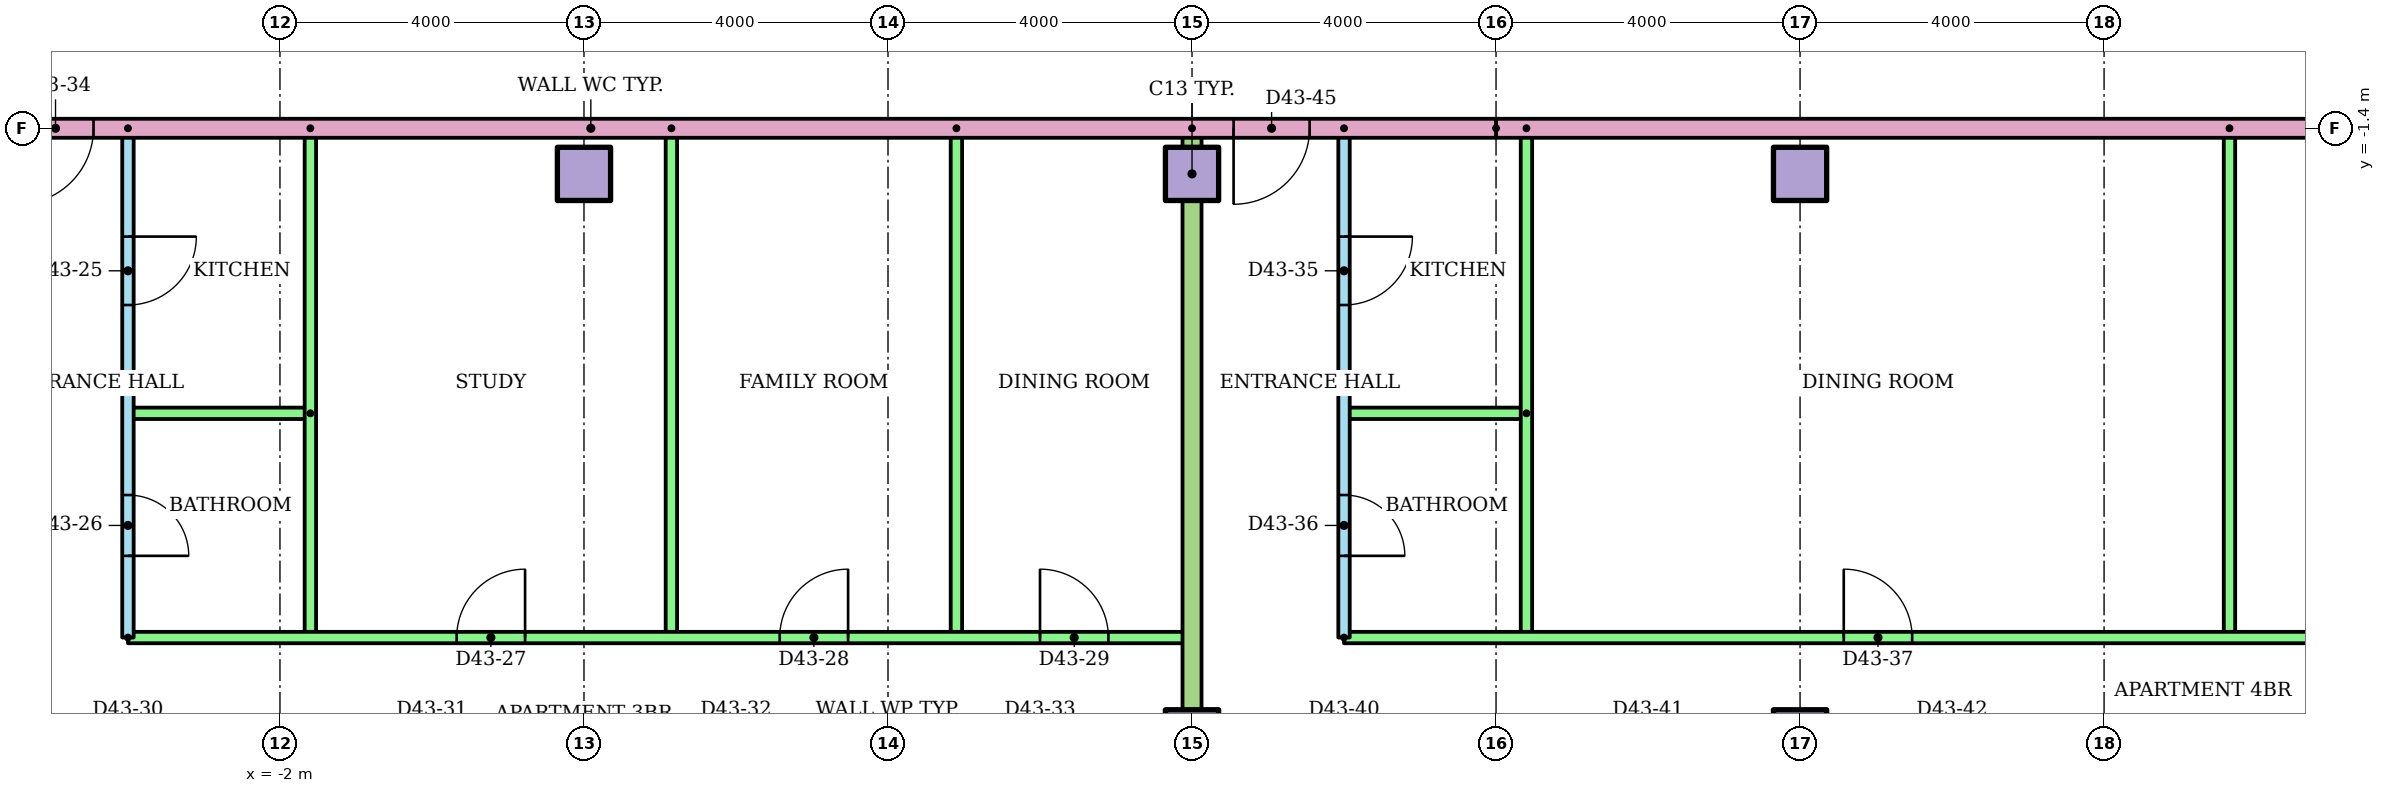
"""IFC4 building model, lengths in metres.
Left out: names, types, materials, properties, quantities, classifications, styles, units other than length and angle.
Written with IfcOpenShell. Run it as: python <this file> out.ifc"""

import sys

from ifc_helpers import new_model, si_unit, direction, frame, frame_2d, origin, origin_2d, place, context, subcontext, project, spatial, rectangle, extrude, element, fill, save


model = new_model("IFC4")
c1 = context("Model", 3, precision=1e-05, world=origin(), true_north=direction((0.0, 1.0)))
c2 = subcontext(c1, "Body", "Model", "MODEL_VIEW")
j1 = project(units=[si_unit("LENGTHUNIT", "METRE"), si_unit("PLANEANGLEUNIT", "RADIAN")], contexts=[c1])
p1 = place(None, origin())
s1 = spatial("IfcSite", under=j1, at=p1, CompositionType="ELEMENT")
p2 = place(p1, origin())
s2 = spatial("IfcBuilding", under=s1, at=p2, CompositionType="ELEMENT")
p3 = place(p2, frame((0.0, 0.0, 168.5)))
s3 = spatial("IfcBuildingStorey", under=s2, at=p3, CompositionType="ELEMENT", Elevation=168.5)
for number, where in (
    (1, (2.0, -9.4, 0.0)),
    (2, (10.0, -9.4, 0.0)),
    (3, (18.0, -9.4, 0.0)),
    (4, (2.0, -2.0, 0.0)),
    (5, (10.0, -2.0, 0.0)),
    (6, (18.0, -2.0, 0.0)),
):
    element("IfcColumn", number, at=place(p3, frame(where)), inside=s3, PredefinedType="COLUMN", context=c2, shape_type="SweptSolid", body=[
        extrude(rectangle(XDim=0.7, YDim=0.7, at=origin_2d()), origin(), (0.0, 0.0, 1.0), 3.2),
    ])
p4 = place(p3, frame((-4.0, -1.4, 0.0), z_axis=(0.0, 0.0, 1.0), x_axis=(0.0, -1.0, 0.0)))
e7 = element("IfcWall", 7, at=p4, inside=s3, PredefinedType="PARTITIONING", context=c2, shape_type="SweptSolid", body=[
    extrude(rectangle(XDim=6.7, YDim=0.15, at=frame_2d((3.35, 0.0))), origin(), (0.0, 0.0, 1.0), 2.4),
])
p5 = place(p4, frame((1.425, 0.0, 0.0)))
e8 = element("IfcOpeningElement", 8, at=p5, cuts=e7, PredefinedType="OPENING", context=c2, shape_type="SweptSolid", body=[
    extrude(rectangle(XDim=0.9, YDim=2.1, at=frame_2d((0.45, 1.05))), frame((0.0, 0.085, 0.0), z_axis=(0.0, -1.0, 0.0), x_axis=(1.0, 0.0, 0.0)), (0.0, 0.0, 1.0), 0.17),
])
p6 = place(p4, frame((4.825, 0.0, 0.0)))
e9 = element("IfcOpeningElement", 9, at=p6, cuts=e7, PredefinedType="OPENING", context=c2, shape_type="SweptSolid", body=[
    extrude(rectangle(XDim=0.8, YDim=2.1, at=frame_2d((0.4, 1.05))), frame((0.0, 0.085, 0.0), z_axis=(0.0, -1.0, 0.0), x_axis=(1.0, 0.0, 0.0)), (0.0, 0.0, 1.0), 0.17),
])
p7 = place(p3, frame((-1.6, -5.15, 0.0), z_axis=(0.0, 0.0, 1.0), x_axis=(-1.0, 0.0, 0.0)))
e10 = element("IfcWall", 10, at=p7, inside=s3, PredefinedType="PARTITIONING", context=c2, shape_type="SweptSolid", body=[
    extrude(rectangle(XDim=2.4, YDim=0.15, at=frame_2d((1.2, 0.0))), origin(), (0.0, 0.0, 1.0), 2.4),
])
for number, where, z_axis, x_axis in (
    (11, (-1.6, -1.4, 0.0), (0.0, 0.0, 1.0), (0.0, -1.0, 0.0)),
    (12, (3.15, -1.4, 0.0), (0.0, 0.0, 1.0), (0.0, -1.0, 0.0)),
    (13, (6.9, -1.4, 0.0), (0.0, 0.0, 1.0), (0.0, -1.0, 0.0)),
):
    element("IfcWall", number, at=place(p3, frame(where, z_axis=z_axis, x_axis=x_axis)), inside=s3, PredefinedType="PARTITIONING", context=c2, shape_type="SweptSolid", body=[
        extrude(rectangle(XDim=6.7, YDim=0.15, at=frame_2d((3.35, 0.0))), origin(), (0.0, 0.0, 1.0), 2.4),
    ])
p8 = place(p3, frame((-4.0, -8.1, 0.0)))
e14 = element("IfcWall", 14, at=p8, inside=s3, PredefinedType="PARTITIONING", context=c2, shape_type="SweptSolid", body=[
    extrude(rectangle(XDim=14.0, YDim=0.15, at=frame_2d((7.0, 0.0))), origin(), (0.0, 0.0, 1.0), 2.4),
])
p9 = place(p8, frame((4.325, 0.0, 0.0)))
e15 = element("IfcOpeningElement", 15, at=p9, cuts=e14, PredefinedType="OPENING", context=c2, shape_type="SweptSolid", body=[
    extrude(rectangle(XDim=0.9, YDim=2.1, at=frame_2d((0.45, 1.05))), frame((0.0, 0.085, 0.0), z_axis=(0.0, -1.0, 0.0), x_axis=(1.0, 0.0, 0.0)), (0.0, 0.0, 1.0), 0.17),
])
p10 = place(p8, frame((8.575, 0.0, 0.0)))
e16 = element("IfcOpeningElement", 16, at=p10, cuts=e14, PredefinedType="OPENING", context=c2, shape_type="SweptSolid", body=[
    extrude(rectangle(XDim=0.9, YDim=2.1, at=frame_2d((0.45, 1.05))), frame((0.0, 0.085, 0.0), z_axis=(0.0, -1.0, 0.0), x_axis=(1.0, 0.0, 0.0)), (0.0, 0.0, 1.0), 0.17),
])
p11 = place(p8, frame((12.0, 0.0, 0.0)))
e17 = element("IfcOpeningElement", 17, at=p11, cuts=e14, PredefinedType="OPENING", context=c2, shape_type="SweptSolid", body=[
    extrude(rectangle(XDim=0.9, YDim=2.1, at=frame_2d((0.45, 1.05))), frame((0.0, 0.085, 0.0), z_axis=(0.0, -1.0, 0.0), x_axis=(1.0, 0.0, 0.0)), (0.0, 0.0, 1.0), 0.17),
])
p12 = place(p3, frame((12.0, -1.4, 0.0), z_axis=(0.0, 0.0, 1.0), x_axis=(0.0, -1.0, 0.0)))
e18 = element("IfcWall", 18, at=p12, inside=s3, PredefinedType="PARTITIONING", context=c2, shape_type="SweptSolid", body=[
    extrude(rectangle(XDim=6.7, YDim=0.15, at=frame_2d((3.35, 0.0))), origin(), (0.0, 0.0, 1.0), 2.4),
])
p13 = place(p12, frame((1.425, 0.0, 0.0)))
e19 = element("IfcOpeningElement", 19, at=p13, cuts=e18, PredefinedType="OPENING", context=c2, shape_type="SweptSolid", body=[
    extrude(rectangle(XDim=0.9, YDim=2.1, at=frame_2d((0.45, 1.05))), frame((0.0, 0.085, 0.0), z_axis=(0.0, -1.0, 0.0), x_axis=(1.0, 0.0, 0.0)), (0.0, 0.0, 1.0), 0.17),
])
p14 = place(p12, frame((4.825, 0.0, 0.0)))
e20 = element("IfcOpeningElement", 20, at=p14, cuts=e18, PredefinedType="OPENING", context=c2, shape_type="SweptSolid", body=[
    extrude(rectangle(XDim=0.8, YDim=2.1, at=frame_2d((0.4, 1.05))), frame((0.0, 0.085, 0.0), z_axis=(0.0, -1.0, 0.0), x_axis=(1.0, 0.0, 0.0)), (0.0, 0.0, 1.0), 0.17),
])
p15 = place(p3, frame((14.4, -5.15, 0.0), z_axis=(0.0, 0.0, 1.0), x_axis=(-1.0, 0.0, 0.0)))
e21 = element("IfcWall", 21, at=p15, inside=s3, PredefinedType="PARTITIONING", context=c2, shape_type="SweptSolid", body=[
    extrude(rectangle(XDim=2.4, YDim=0.15, at=frame_2d((1.2, 0.0))), origin(), (0.0, 0.0, 1.0), 2.4),
])
for number, where, z_axis, x_axis in (
    (22, (14.4, -1.4, 0.0), (0.0, 0.0, 1.0), (0.0, -1.0, 0.0)),
    (23, (23.65, -1.4, 0.0), (0.0, 0.0, 1.0), (0.0, -1.0, 0.0)),
):
    element("IfcWall", number, at=place(p3, frame(where, z_axis=z_axis, x_axis=x_axis)), inside=s3, PredefinedType="PARTITIONING", context=c2, shape_type="SweptSolid", body=[
        extrude(rectangle(XDim=6.7, YDim=0.15, at=frame_2d((3.35, 0.0))), origin(), (0.0, 0.0, 1.0), 2.4),
    ])
p16 = place(p3, frame((12.0, -8.1, 0.0)))
e24 = element("IfcWall", 24, at=p16, inside=s3, PredefinedType="PARTITIONING", context=c2, shape_type="SweptSolid", body=[
    extrude(rectangle(XDim=24.82, YDim=0.15, at=frame_2d((12.41, 0.0))), origin(), (0.0, 0.0, 1.0), 2.4),
])
p17 = place(p16, frame((6.575, 0.0, 0.0)))
e25 = element("IfcOpeningElement", 25, at=p17, cuts=e24, PredefinedType="OPENING", context=c2, shape_type="SweptSolid", body=[
    extrude(rectangle(XDim=0.9, YDim=2.1, at=frame_2d((0.45, 1.05))), frame((0.0, 0.085, 0.0), z_axis=(0.0, -1.0, 0.0), x_axis=(1.0, 0.0, 0.0)), (0.0, 0.0, 1.0), 0.17),
])
p18 = place(p16, frame((14.825, 0.0, 0.0)))
e26 = element("IfcOpeningElement", 26, at=p18, cuts=e24, PredefinedType="OPENING", context=c2, shape_type="SweptSolid", body=[
    extrude(rectangle(XDim=0.9, YDim=2.1, at=frame_2d((0.45, 1.05))), frame((0.0, 0.085, 0.0), z_axis=(0.0, -1.0, 0.0), x_axis=(1.0, 0.0, 0.0)), (0.0, 0.0, 1.0), 0.17),
])
p19 = place(p16, frame((20.553, 0.0, 0.0)))
e27 = element("IfcOpeningElement", 27, at=p19, cuts=e24, PredefinedType="OPENING", context=c2, shape_type="SweptSolid", body=[
    extrude(rectangle(XDim=0.9, YDim=2.1, at=frame_2d((0.45, 1.05))), frame((0.0, 0.085, 0.0), z_axis=(0.0, -1.0, 0.0), x_axis=(1.0, 0.0, 0.0)), (0.0, 0.0, 1.0), 0.17),
])
p20 = place(p3, frame((10.0, -1.4, 0.0), z_axis=(0.0, 0.0, 1.0), x_axis=(0.0, -1.0, 0.0)))
e28 = element("IfcWall", 28, at=p20, inside=s3, PredefinedType="PARTITIONING", context=c2, shape_type="SweptSolid", body=[
    extrude(rectangle(XDim=15.01, YDim=0.25, at=frame_2d((7.505, 0.0))), origin(), (0.0, 0.0, 1.0), 2.4),
])
p21 = place(p3, frame((29.0, -1.4, 0.0), z_axis=(0.0, 0.0, 1.0), x_axis=(-1.0, 0.0, 0.0)))
e29 = element("IfcWall", 29, at=p21, inside=s3, PredefinedType="PARTITIONING", context=c2, shape_type="SweptSolid", body=[
    extrude(rectangle(XDim=15.0, YDim=0.25, at=frame_2d((7.5, 0.0))), origin(), (0.0, 0.0, 1.0), 2.4),
])
p22 = place(p3, frame((14.0, -1.4, 0.0), z_axis=(0.0, 0.0, 1.0), x_axis=(-1.0, 0.0, 0.0)))
e30 = element("IfcWall", 30, at=p22, inside=s3, PredefinedType="PARTITIONING", context=c2, shape_type="SweptSolid", body=[
    extrude(rectangle(XDim=28.0, YDim=0.25, at=frame_2d((14.0, 0.0))), origin(), (0.0, 0.0, 1.0), 2.4),
])
p23 = place(p22, frame((20.547, 0.0, 0.0)))
e31 = element("IfcOpeningElement", 31, at=p23, cuts=e30, PredefinedType="OPENING", context=c2, shape_type="SweptSolid", body=[
    extrude(rectangle(XDim=1.0, YDim=2.1, at=frame_2d((0.5, 1.05))), frame((0.0, 0.135, 0.0), z_axis=(0.0, -1.0, 0.0), x_axis=(1.0, 0.0, 0.0)), (0.0, 0.0, 1.0), 0.27),
])
p24 = place(p22, frame((18.453, 0.0, 0.0)))
e32 = element("IfcOpeningElement", 32, at=p24, cuts=e30, PredefinedType="OPENING", context=c2, shape_type="SweptSolid", body=[
    extrude(rectangle(XDim=1.0, YDim=2.1, at=frame_2d((0.5, 1.05))), frame((0.0, 0.135, 0.0), z_axis=(0.0, -1.0, 0.0), x_axis=(1.0, 0.0, 0.0)), (0.0, 0.0, 1.0), 0.27),
])
p25 = place(p22, frame((2.453, 0.0, 0.0)))
e33 = element("IfcOpeningElement", 33, at=p25, cuts=e30, PredefinedType="OPENING", context=c2, shape_type="SweptSolid", body=[
    extrude(rectangle(XDim=1.0, YDim=2.1, at=frame_2d((0.5, 1.05))), frame((0.0, 0.135, 0.0), z_axis=(0.0, -1.0, 0.0), x_axis=(1.0, 0.0, 0.0)), (0.0, 0.0, 1.0), 0.27),
])
p26 = place(p5, origin())
e34 = element("IfcDoor", 34, at=p26, inside=s3, OperationType="SINGLE_SWING_LEFT", PredefinedType="DOOR", context=c2, shape_type="SweptSolid", body=[
    extrude(rectangle(XDim=0.9, YDim=2.1, at=frame_2d((0.45, 1.05))), frame((0.0, 0.025, 0.0), z_axis=(0.0, -1.0, 0.0), x_axis=(1.0, 0.0, 0.0)), (0.0, 0.0, 1.0), 0.05),
])
fill(e8, e34)
p27 = place(p6, origin())
e35 = element("IfcDoor", 35, at=p27, inside=s3, OperationType="SINGLE_SWING_RIGHT", PredefinedType="DOOR", context=c2, shape_type="SweptSolid", body=[
    extrude(rectangle(XDim=0.8, YDim=2.1, at=frame_2d((0.4, 1.05))), frame((0.0, 0.025, 0.0), z_axis=(0.0, -1.0, 0.0), x_axis=(1.0, 0.0, 0.0)), (0.0, 0.0, 1.0), 0.05),
])
fill(e9, e35)
p28 = place(p9, origin())
e36 = element("IfcDoor", 36, at=p28, inside=s3, OperationType="SINGLE_SWING_RIGHT", PredefinedType="DOOR", context=c2, shape_type="SweptSolid", body=[
    extrude(rectangle(XDim=0.9, YDim=2.1, at=frame_2d((0.45, 1.05))), frame((0.0, 0.025, 0.0), z_axis=(0.0, -1.0, 0.0), x_axis=(1.0, 0.0, 0.0)), (0.0, 0.0, 1.0), 0.05),
])
fill(e15, e36)
p29 = place(p10, origin())
e37 = element("IfcDoor", 37, at=p29, inside=s3, OperationType="SINGLE_SWING_RIGHT", PredefinedType="DOOR", context=c2, shape_type="SweptSolid", body=[
    extrude(rectangle(XDim=0.9, YDim=2.1, at=frame_2d((0.45, 1.05))), frame((0.0, 0.025, 0.0), z_axis=(0.0, -1.0, 0.0), x_axis=(1.0, 0.0, 0.0)), (0.0, 0.0, 1.0), 0.05),
])
fill(e16, e37)
p30 = place(p11, origin())
e38 = element("IfcDoor", 38, at=p30, inside=s3, OperationType="SINGLE_SWING_LEFT", PredefinedType="DOOR", context=c2, shape_type="SweptSolid", body=[
    extrude(rectangle(XDim=0.9, YDim=2.1, at=frame_2d((0.45, 1.05))), frame((0.0, 0.025, 0.0), z_axis=(0.0, -1.0, 0.0), x_axis=(1.0, 0.0, 0.0)), (0.0, 0.0, 1.0), 0.05),
])
fill(e17, e38)
p31 = place(p24, origin())
e39 = element("IfcDoor", 39, at=p31, inside=s3, OperationType="SINGLE_SWING_RIGHT", PredefinedType="DOOR", context=c2, shape_type="SweptSolid", body=[
    extrude(rectangle(XDim=1.0, YDim=2.1, at=frame_2d((0.5, 1.05))), frame((0.0, 0.025, 0.0), z_axis=(0.0, -1.0, 0.0), x_axis=(1.0, 0.0, 0.0)), (0.0, 0.0, 1.0), 0.05),
])
fill(e32, e39)
p32 = place(p13, origin())
e40 = element("IfcDoor", 40, at=p32, inside=s3, OperationType="SINGLE_SWING_LEFT", PredefinedType="DOOR", context=c2, shape_type="SweptSolid", body=[
    extrude(rectangle(XDim=0.9, YDim=2.1, at=frame_2d((0.45, 1.05))), frame((0.0, 0.025, 0.0), z_axis=(0.0, -1.0, 0.0), x_axis=(1.0, 0.0, 0.0)), (0.0, 0.0, 1.0), 0.05),
])
fill(e19, e40)
p33 = place(p14, origin())
e41 = element("IfcDoor", 41, at=p33, inside=s3, OperationType="SINGLE_SWING_RIGHT", PredefinedType="DOOR", context=c2, shape_type="SweptSolid", body=[
    extrude(rectangle(XDim=0.8, YDim=2.1, at=frame_2d((0.4, 1.05))), frame((0.0, 0.025, 0.0), z_axis=(0.0, -1.0, 0.0), x_axis=(1.0, 0.0, 0.0)), (0.0, 0.0, 1.0), 0.05),
])
fill(e20, e41)
p34 = place(p17, origin())
e42 = element("IfcDoor", 42, at=p34, inside=s3, OperationType="SINGLE_SWING_LEFT", PredefinedType="DOOR", context=c2, shape_type="SweptSolid", body=[
    extrude(rectangle(XDim=0.9, YDim=2.1, at=frame_2d((0.45, 1.05))), frame((0.0, 0.025, 0.0), z_axis=(0.0, -1.0, 0.0), x_axis=(1.0, 0.0, 0.0)), (0.0, 0.0, 1.0), 0.05),
])
fill(e25, e42)
p35 = place(p25, origin())
e43 = element("IfcDoor", 43, at=p35, inside=s3, OperationType="SINGLE_SWING_RIGHT", PredefinedType="DOOR", context=c2, shape_type="SweptSolid", body=[
    extrude(rectangle(XDim=1.0, YDim=2.1, at=frame_2d((0.5, 1.05))), frame((0.0, 0.025, 0.0), z_axis=(0.0, -1.0, 0.0), x_axis=(1.0, 0.0, 0.0)), (0.0, 0.0, 1.0), 0.05),
])
fill(e33, e43)
save(model, sys.argv[1])
